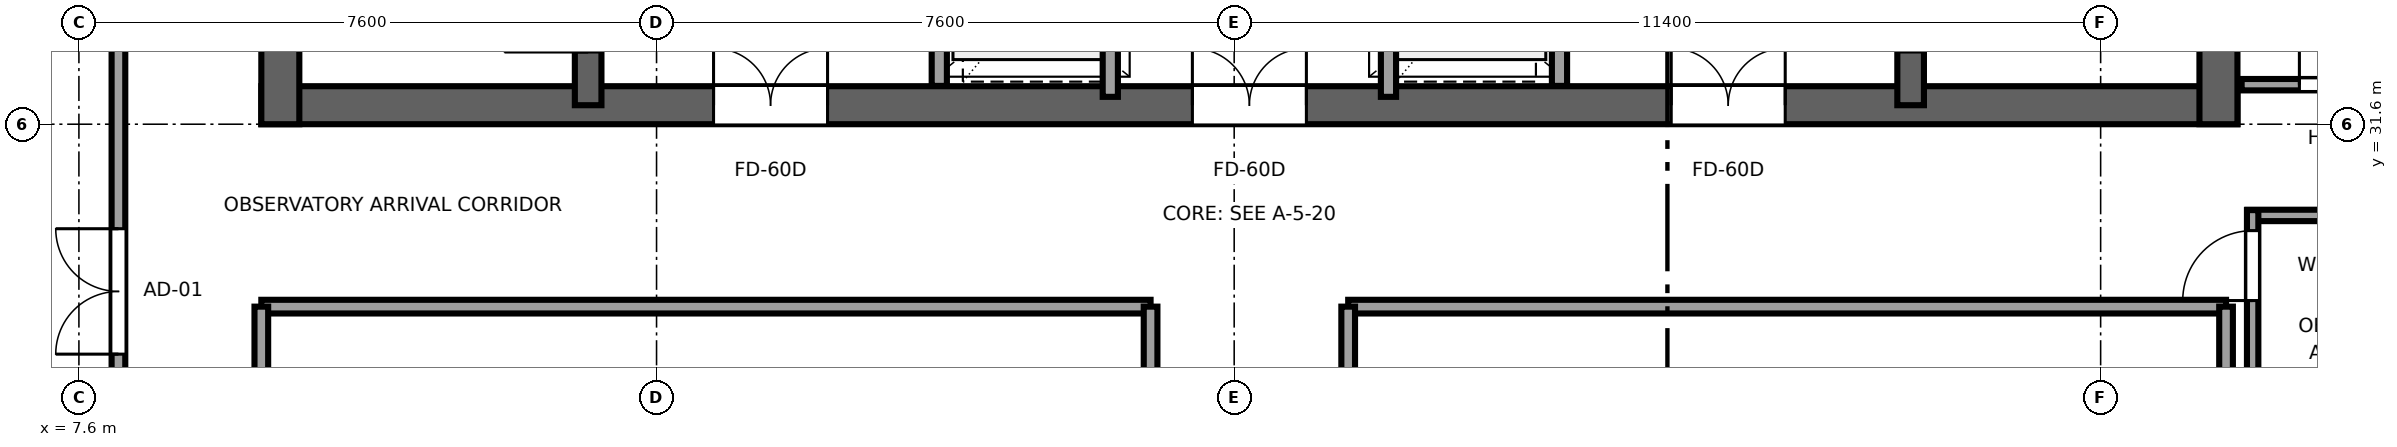
"""IFC4 building model, lengths in metres.
Left out: names, types, materials, properties, quantities, classifications, styles, units other than length and angle.
Written with IfcOpenShell. Run it as: python <this file> out.ifc"""

import sys

from ifc_helpers import new_model, si_unit, direction, frame, frame_2d, origin, place, context, subcontext, project, spatial, rectangle, extrude, source, transform, mapped, element, fill, save


model = new_model("IFC4")
c1 = context("Model", 3, precision=1e-05, world=origin(), true_north=direction((0.0, 1.0)))
c2 = subcontext(c1, "Body", "Model", "MODEL_VIEW")
j1 = project(units=[si_unit("LENGTHUNIT", "METRE"), si_unit("PLANEANGLEUNIT", "RADIAN")], contexts=[c1])
p1 = place(None, origin())
s1 = spatial("IfcSite", under=j1, at=p1, CompositionType="ELEMENT")
p2 = place(p1, origin())
s2 = spatial("IfcBuilding", under=s1, at=p2, CompositionType="ELEMENT")
p3 = place(p2, frame((0.0, 0.0, 282.15)))
s3 = spatial("IfcBuildingStorey", under=s2, at=p3, CompositionType="ELEMENT", Elevation=282.15)
p4 = place(p3, frame((10.0, 31.85, 0.0), z_axis=(0.0, 0.0, 1.0), x_axis=(1.0, 0.0, 0.0)))
e1 = element("IfcWall", 1, at=p4, inside=s3, PredefinedType="SHEAR", context=c2, shape_type="SweptSolid", body=[
    extrude(rectangle(XDim=26.0, YDim=0.5, at=frame_2d((13.0, 0.0))), origin(), (0.0, 0.0, 1.0), 4.4),
])
p5 = place(p4, frame((7.45, 0.0, 0.0), z_axis=(0.0, 0.0, 1.0), x_axis=(-1.0, 0.0, 0.0)))
e2 = element("IfcOpeningElement", 2, at=p5, cuts=e1, PredefinedType="OPENING", context=c2, shape_type="SweptSolid", body=[
    extrude(rectangle(XDim=1.5, YDim=2.04, at=frame_2d((0.75, 1.02))), frame((0.0, 0.26, 0.0), z_axis=(0.0, -1.0, 0.0), x_axis=(1.0, 0.0, 0.0)), (0.0, 0.0, 1.0), 0.52),
])
p6 = place(p4, frame((13.75, 0.0, 0.0), z_axis=(0.0, 0.0, 1.0), x_axis=(-1.0, 0.0, 0.0)))
e3 = element("IfcOpeningElement", 3, at=p6, cuts=e1, PredefinedType="OPENING", context=c2, shape_type="SweptSolid", body=[
    extrude(rectangle(XDim=1.5, YDim=2.04, at=frame_2d((0.75, 1.02))), frame((0.0, 0.26, 0.0), z_axis=(0.0, -1.0, 0.0), x_axis=(1.0, 0.0, 0.0)), (0.0, 0.0, 1.0), 0.52),
])
p7 = place(p4, frame((20.05, 0.0, 0.0), z_axis=(0.0, 0.0, 1.0), x_axis=(-1.0, 0.0, 0.0)))
e4 = element("IfcOpeningElement", 4, at=p7, cuts=e1, PredefinedType="OPENING", context=c2, shape_type="SweptSolid", body=[
    extrude(rectangle(XDim=1.5, YDim=2.04, at=frame_2d((0.75, 1.02))), frame((0.0, 0.26, 0.0), z_axis=(0.0, -1.0, 0.0), x_axis=(1.0, 0.0, 0.0)), (0.0, 0.0, 1.0), 0.52),
])
for number, where, z_axis, x_axis in (
    (5, (10.25, 31.6, 0.0), (0.0, 0.0, 1.0), (0.0, 1.0, 0.0)),
    (6, (35.75, 31.6, 0.0), (0.0, 0.0, 1.0), (0.0, 1.0, 0.0)),
):
    element("IfcWall", number, at=place(p3, frame(where, z_axis=z_axis, x_axis=x_axis)), inside=s3, PredefinedType="SHEAR", context=c2, shape_type="SweptSolid", body=[
        extrude(rectangle(XDim=13.6, YDim=0.5, at=frame_2d((6.8, 0.0))), origin(), (0.0, 0.0, 1.0), 4.4),
    ])
p8 = place(p3, frame((14.3, 31.85, 0.0), z_axis=(0.0, 0.0, 1.0), x_axis=(0.0, 1.0, 0.0)))
e7 = element("IfcWall", 7, at=p8, inside=s3, PredefinedType="SHEAR", context=c2, shape_type="SweptSolid", body=[
    extrude(rectangle(XDim=13.1, YDim=0.35, at=frame_2d((6.55, 0.0))), origin(), (0.0, 0.0, 1.0), 4.4),
])
p9 = place(p8, frame((0.7, 0.0, 0.0)))
e8 = element("IfcOpeningElement", 8, at=p9, cuts=e7, PredefinedType="OPENING", context=c2, shape_type="SweptSolid", body=[
    extrude(rectangle(XDim=1.1, YDim=2.12, at=frame_2d((0.55, 1.06))), frame((0.0, 0.185, 0.0), z_axis=(0.0, -1.0, 0.0), x_axis=(1.0, 0.0, 0.0)), (0.0, 0.0, 1.0), 0.37),
])
p10 = place(p3, frame((31.7, 31.85, 0.0), z_axis=(0.0, 0.0, 1.0), x_axis=(0.0, 1.0, 0.0)))
e9 = element("IfcWall", 9, at=p10, inside=s3, PredefinedType="SHEAR", context=c2, shape_type="SweptSolid", body=[
    extrude(rectangle(XDim=13.1, YDim=0.35, at=frame_2d((6.55, 0.0))), origin(), (0.0, 0.0, 1.0), 4.4),
])
p11 = place(p10, frame((1.8, 0.0, 0.0), z_axis=(0.0, 0.0, 1.0), x_axis=(-1.0, 0.0, 0.0)))
e10 = element("IfcOpeningElement", 10, at=p11, cuts=e9, PredefinedType="OPENING", context=c2, shape_type="SweptSolid", body=[
    extrude(rectangle(XDim=1.1, YDim=2.12, at=frame_2d((0.55, 1.06))), frame((0.0, 0.185, 0.0), z_axis=(0.0, -1.0, 0.0), x_axis=(1.0, 0.0, 0.0)), (0.0, 0.0, 1.0), 0.37),
])
for number, where, z_axis, x_axis in (
    (11, (18.92, 32.104, 0.0), (0.0, 0.0, 1.0), (0.0, 1.0, 0.0)),
    (12, (27.08, 32.104, 0.0), (0.0, 0.0, 1.0), (0.0, 1.0, 0.0)),
):
    element("IfcWall", number, at=place(p3, frame(where, z_axis=z_axis, x_axis=x_axis)), inside=s3, PredefinedType="SOLIDWALL", context=c2, shape_type="SweptSolid", body=[
        extrude(rectangle(XDim=4.046, YDim=0.2, at=frame_2d((2.023, 0.0))), origin(), (0.0, 0.0, 1.0), 4.18),
    ])
p12 = place(p3, frame((21.17, 31.96, 0.0), z_axis=(0.0, 0.0, 1.0), x_axis=(0.0, 1.0, 0.0)))
e13 = element("IfcWall", 13, at=p12, inside=s3, PredefinedType="SOLIDWALL", context=c2, shape_type="SweptSolid", body=[
    extrude(rectangle(XDim=5.08, YDim=0.2, at=frame_2d((2.54, 0.0))), origin(), (0.0, 0.0, 1.0), 4.18),
])
p13 = place(p12, frame((0.74, 0.0, 0.0)))
e14 = element("IfcOpeningElement", 14, at=p13, cuts=e13, PredefinedType="OPENING", context=c2, shape_type="SweptSolid", body=[
    extrude(rectangle(XDim=1.1, YDim=2.12, at=frame_2d((0.55, 1.06))), frame((0.0, 0.11, 0.0), z_axis=(0.0, -1.0, 0.0), x_axis=(1.0, 0.0, 0.0)), (0.0, 0.0, 1.0), 0.22),
])
p14 = place(p12, frame((3.24, 0.0, 0.0)))
e15 = element("IfcOpeningElement", 15, at=p14, cuts=e13, PredefinedType="OPENING", context=c2, shape_type="SweptSolid", body=[
    extrude(rectangle(XDim=1.1, YDim=2.12, at=frame_2d((0.55, 1.06))), frame((0.0, 0.11, 0.0), z_axis=(0.0, -1.0, 0.0), x_axis=(1.0, 0.0, 0.0)), (0.0, 0.0, 1.0), 0.22),
])
p15 = place(p3, frame((24.83, 31.96, 0.0), z_axis=(0.0, 0.0, 1.0), x_axis=(0.0, 1.0, 0.0)))
e16 = element("IfcWall", 16, at=p15, inside=s3, PredefinedType="SOLIDWALL", context=c2, shape_type="SweptSolid", body=[
    extrude(rectangle(XDim=5.08, YDim=0.2, at=frame_2d((2.54, 0.0))), origin(), (0.0, 0.0, 1.0), 4.18),
])
p16 = place(p15, frame((0.74, 0.0, 0.0)))
e17 = element("IfcOpeningElement", 17, at=p16, cuts=e16, PredefinedType="OPENING", context=c2, shape_type="SweptSolid", body=[
    extrude(rectangle(XDim=1.1, YDim=2.12, at=frame_2d((0.55, 1.06))), frame((0.0, 0.11, 0.0), z_axis=(0.0, -1.0, 0.0), x_axis=(1.0, 0.0, 0.0)), (0.0, 0.0, 1.0), 0.22),
])
p17 = place(p15, frame((3.24, 0.0, 0.0)))
e18 = element("IfcOpeningElement", 18, at=p17, cuts=e16, PredefinedType="OPENING", context=c2, shape_type="SweptSolid", body=[
    extrude(rectangle(XDim=1.1, YDim=2.12, at=frame_2d((0.55, 1.06))), frame((0.0, 0.11, 0.0), z_axis=(0.0, -1.0, 0.0), x_axis=(1.0, 0.0, 0.0)), (0.0, 0.0, 1.0), 0.22),
])
p18 = place(p3, frame((36.055, 32.12, 0.0), z_axis=(0.0, 0.0, 1.0), x_axis=(1.0, 0.0, 0.0)))
e19 = element("IfcWall", 19, at=p18, inside=s3, PredefinedType="PARTITIONING", context=c2, shape_type="SweptSolid", body=[
    extrude(rectangle(XDim=2.54, YDim=0.15, at=frame_2d((1.27, 0.0))), origin(), (0.0, 0.0, 1.0), 4.18),
])
p19 = place(p18, frame((0.76, 0.0, 0.0)))
e20 = element("IfcOpeningElement", 20, at=p19, cuts=e19, PredefinedType="OPENING", context=c2, shape_type="SweptSolid", body=[
    extrude(rectangle(XDim=1.02, YDim=2.03, at=frame_2d((0.51, 1.015))), frame((0.0, 0.085, 0.0), z_axis=(0.0, -1.0, 0.0), x_axis=(1.0, 0.0, 0.0)), (0.0, 0.0, 1.0), 0.17),
])
p20 = place(p3, frame((10.0, 29.2, 0.0), z_axis=(0.0, 0.0, 1.0), x_axis=(1.0, 0.0, 0.0)))
e21 = element("IfcWall", 21, at=p20, inside=s3, PredefinedType="PARTITIONING", context=c2, shape_type="SweptSolid", body=[
    extrude(rectangle(XDim=11.7, YDim=0.18, at=frame_2d((5.85, 0.0))), origin(), (0.0, 0.0, 1.0), 4.18),
])
for number, where, z_axis, x_axis in (
    (22, (10.0, 26.05, 0.0), (0.0, 0.0, 1.0), (0.0, 1.0, 0.0)),
    (23, (21.7, 26.05, 0.0), (0.0, 0.0, 1.0), (0.0, 1.0, 0.0)),
):
    element("IfcWall", number, at=place(p3, frame(where, z_axis=z_axis, x_axis=x_axis)), inside=s3, PredefinedType="PARTITIONING", context=c2, shape_type="SweptSolid", body=[
        extrude(rectangle(XDim=3.15, YDim=0.18, at=frame_2d((1.575, 0.0))), origin(), (0.0, 0.0, 1.0), 4.18),
    ])
p21 = place(p3, frame((24.3, 29.2, 0.0), z_axis=(0.0, 0.0, 1.0), x_axis=(1.0, 0.0, 0.0)))
e24 = element("IfcWall", 24, at=p21, inside=s3, PredefinedType="PARTITIONING", context=c2, shape_type="SweptSolid", body=[
    extrude(rectangle(XDim=11.55, YDim=0.18, at=frame_2d((5.775, 0.0))), origin(), (0.0, 0.0, 1.0), 4.18),
])
for number, where, z_axis, x_axis in (
    (25, (24.3, 26.05, 0.0), (0.0, 0.0, 1.0), (0.0, 1.0, 0.0)),
    (26, (35.85, 26.05, 0.0), (0.0, 0.0, 1.0), (0.0, 1.0, 0.0)),
):
    element("IfcWall", number, at=place(p3, frame(where, z_axis=z_axis, x_axis=x_axis)), inside=s3, PredefinedType="PARTITIONING", context=c2, shape_type="SweptSolid", body=[
        extrude(rectangle(XDim=3.15, YDim=0.18, at=frame_2d((1.575, 0.0))), origin(), (0.0, 0.0, 1.0), 4.18),
    ])
p22 = place(p3, frame((8.12, 24.4, 0.0), z_axis=(0.0, 0.0, 1.0), x_axis=(0.0, 1.0, 0.0)))
e27 = element("IfcWall", 27, at=p22, inside=s3, PredefinedType="PARTITIONING", context=c2, shape_type="SweptSolid", body=[
    extrude(rectangle(XDim=10.0, YDim=0.18, at=frame_2d((5.0, 0.0))), origin(), (0.0, 0.0, 1.0), 4.18),
])
p23 = place(p22, frame((4.175, 0.0, 0.0)))
e28 = element("IfcOpeningElement", 28, at=p23, cuts=e27, PredefinedType="OPENING", context=c2, shape_type="SweptSolid", body=[
    extrude(rectangle(XDim=1.65, YDim=2.15, at=frame_2d((0.825, 1.075))), frame((0.0, 0.1, 0.0), z_axis=(0.0, -1.0, 0.0), x_axis=(1.0, 0.0, 0.0)), (0.0, 0.0, 1.0), 0.2),
])
p24 = place(p3, frame((36.13, 30.4, 0.0), z_axis=(0.0, 0.0, 1.0), x_axis=(1.0, 0.0, 0.0)))
e29 = element("IfcWall", 29, at=p24, inside=s3, PredefinedType="PARTITIONING", context=c2, shape_type="SweptSolid", body=[
    extrude(rectangle(XDim=2.465, YDim=0.15, at=frame_2d((1.232, 0.0))), origin(), (0.0, 0.0, 1.0), 4.18),
])
p25 = place(p3, frame((36.2, 27.73, 0.0), z_axis=(0.0, 0.0, 1.0), x_axis=(0.0, 1.0, 0.0)))
e30 = element("IfcWall", 30, at=p25, inside=s3, PredefinedType="PARTITIONING", context=c2, shape_type="SweptSolid", body=[
    extrude(rectangle(XDim=2.74, YDim=0.15, at=frame_2d((1.37, 0.0))), origin(), (0.0, 0.0, 1.0), 4.18),
])
p26 = place(p25, frame((1.55, 0.0, 0.0)))
e31 = element("IfcOpeningElement", 31, at=p26, cuts=e30, PredefinedType="OPENING", context=c2, shape_type="SweptSolid", body=[
    extrude(rectangle(XDim=0.92, YDim=2.01, at=frame_2d((0.46, 1.005))), frame((0.0, 0.085, 0.0), z_axis=(0.0, -1.0, 0.0), x_axis=(1.0, 0.0, 0.0)), (0.0, 0.0, 1.0), 0.17),
])
m1 = source(origin(), c2, "Body", "SweptSolid", [
    extrude(rectangle(XDim=1.5, YDim=2.04, at=frame_2d((0.75, 1.02))), frame((0.0, 0.025, 0.0), z_axis=(0.0, -1.0, 0.0), x_axis=(1.0, 0.0, 0.0)), (0.0, 0.0, 1.0), 0.05),
])
p27 = place(p5, origin())
e32 = element("IfcDoor", 32, at=p27, inside=s3, OperationType="DOUBLE_DOOR_SINGLE_SWING", PredefinedType="DOOR", context=c2, shape_type="MappedRepresentation", body=[
    mapped(m1, transform((0.0, 0.0, 0.0), x_axis=(1.0, 0.0, 0.0), y_axis=(0.0, 1.0, 0.0), z_axis=(0.0, 0.0, 1.0), scale=1.0)),
])
fill(e2, e32)
p28 = place(p6, origin())
e33 = element("IfcDoor", 33, at=p28, inside=s3, OperationType="DOUBLE_DOOR_SINGLE_SWING", PredefinedType="DOOR", context=c2, shape_type="MappedRepresentation", body=[
    mapped(m1, transform((0.0, 0.0, 0.0), x_axis=(1.0, 0.0, 0.0), y_axis=(0.0, 1.0, 0.0), z_axis=(0.0, 0.0, 1.0), scale=1.0)),
])
fill(e3, e33)
p29 = place(p7, origin())
e34 = element("IfcDoor", 34, at=p29, inside=s3, OperationType="DOUBLE_DOOR_SINGLE_SWING", PredefinedType="DOOR", context=c2, shape_type="MappedRepresentation", body=[
    mapped(m1, transform((0.0, 0.0, 0.0), x_axis=(1.0, 0.0, 0.0), y_axis=(0.0, 1.0, 0.0), z_axis=(0.0, 0.0, 1.0), scale=1.0)),
])
fill(e4, e34)
m2 = source(origin(), c2, "Body", "SweptSolid", [
    extrude(rectangle(XDim=1.02, YDim=2.03, at=frame_2d((0.51, 1.015))), frame((0.0, 0.025, 0.0), z_axis=(0.0, -1.0, 0.0), x_axis=(1.0, 0.0, 0.0)), (0.0, 0.0, 1.0), 0.05),
])
p30 = place(p19, origin())
e35 = element("IfcDoor", 35, at=p30, inside=s3, OperationType="SINGLE_SWING_LEFT", PredefinedType="DOOR", context=c2, shape_type="MappedRepresentation", body=[
    mapped(m2, transform((0.0, 0.0, 0.0), x_axis=(1.0, 0.0, 0.0), y_axis=(0.0, 1.0, 0.0), z_axis=(0.0, 0.0, 1.0), scale=1.0)),
])
fill(e20, e35)
m3 = source(origin(), c2, "Body", "SweptSolid", [
    extrude(rectangle(XDim=1.65, YDim=2.15, at=frame_2d((0.825, 1.075))), frame((0.0, 0.025, 0.0), z_axis=(0.0, -1.0, 0.0), x_axis=(1.0, 0.0, 0.0)), (0.0, 0.0, 1.0), 0.05),
])
p31 = place(p23, origin())
e36 = element("IfcDoor", 36, at=p31, inside=s3, OperationType="DOUBLE_DOOR_SINGLE_SWING", PredefinedType="DOOR", context=c2, shape_type="MappedRepresentation", body=[
    mapped(m3, transform((0.0, 0.0, 0.0), x_axis=(1.0, 0.0, 0.0), y_axis=(0.0, 1.0, 0.0), z_axis=(0.0, 0.0, 1.0), scale=1.0)),
])
fill(e28, e36)
m4 = source(origin(), c2, "Body", "SweptSolid", [
    extrude(rectangle(XDim=0.92, YDim=2.01, at=frame_2d((0.46, 1.005))), frame((0.0, 0.025, 0.0), z_axis=(0.0, -1.0, 0.0), x_axis=(1.0, 0.0, 0.0)), (0.0, 0.0, 1.0), 0.05),
])
p32 = place(p26, origin())
e37 = element("IfcDoor", 37, at=p32, inside=s3, OperationType="SINGLE_SWING_LEFT", PredefinedType="DOOR", context=c2, shape_type="MappedRepresentation", body=[
    mapped(m4, transform((0.0, 0.0, 0.0), x_axis=(1.0, 0.0, 0.0), y_axis=(0.0, 1.0, 0.0), z_axis=(0.0, 0.0, 1.0), scale=1.0)),
])
fill(e31, e37)
save(model, sys.argv[1])
